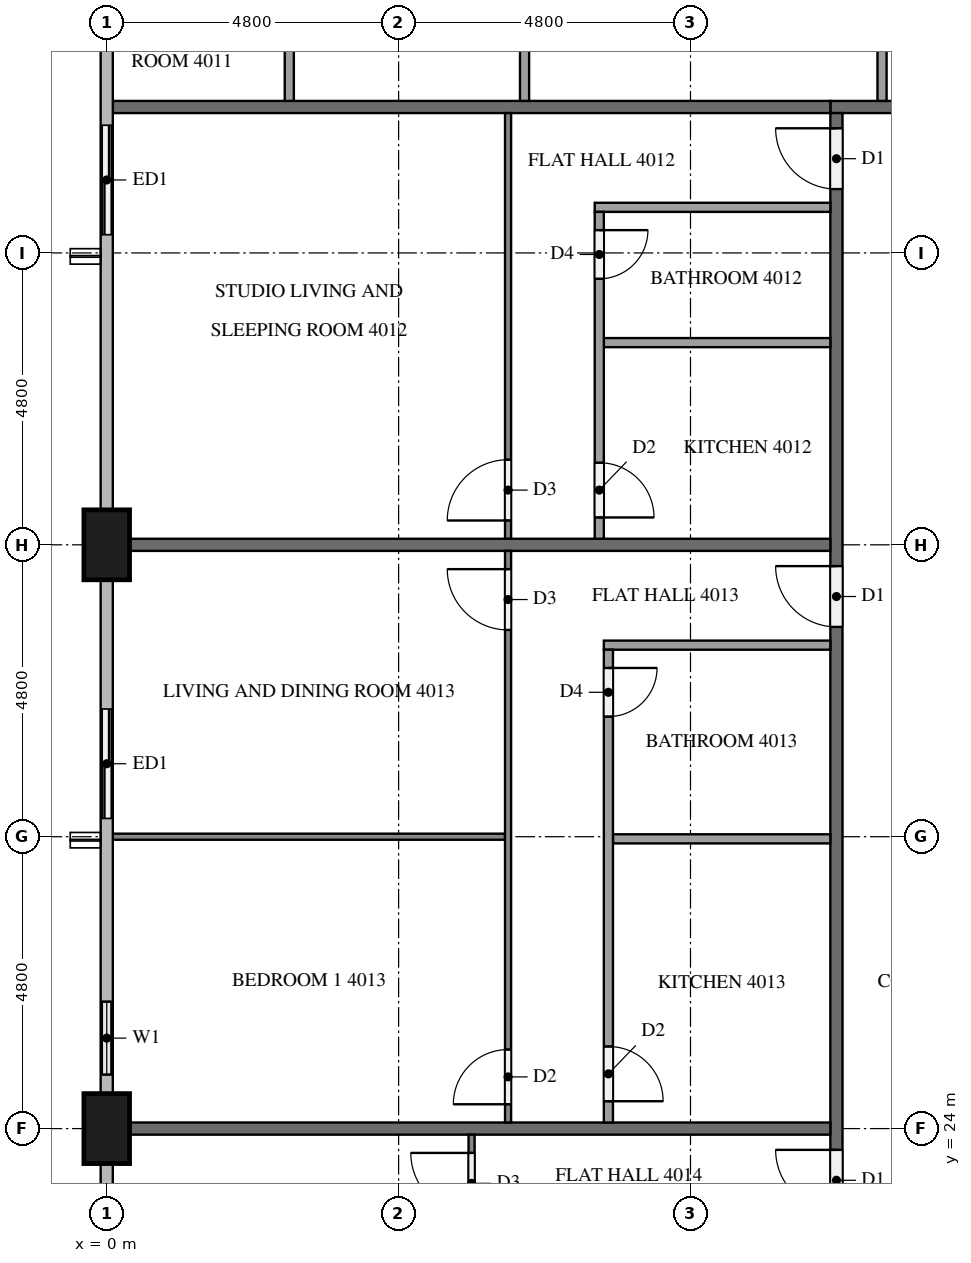
"""IFC4 building model, lengths in metres.
Left out: names, types, materials, properties, quantities, classifications, styles, units other than length and angle.
Written with IfcOpenShell. Run it as: python <this file> out.ifc"""

import sys

from ifc_helpers import new_model, si_unit, direction, frame, frame_2d, origin, origin_2d, place, context, subcontext, project, spatial, rectangle, extrude, element, fill, save


model = new_model("IFC4")
c1 = context("Model", 3, precision=1e-05, world=origin(), true_north=direction((0.0, 1.0)))
c2 = subcontext(c1, "Body", "Model", "MODEL_VIEW")
j1 = project(units=[si_unit("LENGTHUNIT", "METRE"), si_unit("PLANEANGLEUNIT", "RADIAN")], contexts=[c1])
p1 = place(None, origin())
s1 = spatial("IfcSite", under=j1, at=p1, CompositionType="ELEMENT")
p2 = place(p1, origin())
s2 = spatial("IfcBuilding", under=s1, at=p2, CompositionType="ELEMENT")
p3 = place(p2, frame((0.0, 0.0, 156.0)))
s3 = spatial("IfcBuildingStorey", under=s2, at=p3, CompositionType="ELEMENT", Elevation=156.0)
for number, where, z_axis, x_axis in (
    (1, (0.0, 33.6, 0.0), (0.0, 0.0, 1.0), (0.0, 1.0, 0.0)),
    (2, (0.0, 24.0, 0.0), (0.0, 0.0, 1.0), (0.0, 1.0, 0.0)),
):
    element("IfcColumn", number, at=place(p3, frame(where, z_axis=z_axis, x_axis=x_axis)), inside=s3, PredefinedType="COLUMN", context=c2, shape_type="SweptSolid", body=[
        extrude(rectangle(XDim=1.15, YDim=0.75, at=origin_2d()), origin(), (0.0, 0.0, 1.0), 3.2),
    ])
p4 = place(p3, frame((0.0, 40.8, 0.0), z_axis=(0.0, 0.0, 1.0), x_axis=(0.0, -1.0, 0.0)))
e3 = element("IfcWall", 3, at=p4, inside=s3, PredefinedType="SOLIDWALL", context=c2, shape_type="SweptSolid", body=[
    extrude(rectangle(XDim=2.4, YDim=0.15, at=frame_2d((1.2, 0.0))), origin(), (0.0, 0.0, 1.0), 3.2),
])
p5 = place(p4, frame((0.3, 0.0, 0.0)))
e4 = element("IfcOpeningElement", 4, at=p5, cuts=e3, PredefinedType="OPENING", context=c2, shape_type="SweptSolid", body=[
    extrude(rectangle(XDim=1.8, YDim=2.4, at=frame_2d((0.9, 1.2))), frame((0.0, 0.085, 0.0), z_axis=(0.0, -1.0, 0.0), x_axis=(1.0, 0.0, 0.0)), (0.0, 0.0, 1.0), 0.17),
])
p6 = place(p3, frame((0.0, 31.2, 0.0), z_axis=(0.0, 0.0, 1.0), x_axis=(0.0, -1.0, 0.0)))
e5 = element("IfcWall", 5, at=p6, inside=s3, PredefinedType="SOLIDWALL", context=c2, shape_type="SweptSolid", body=[
    extrude(rectangle(XDim=2.4, YDim=0.15, at=frame_2d((1.2, 0.0))), origin(), (0.0, 0.0, 1.0), 3.2),
])
p7 = place(p6, frame((0.3, 0.0, 0.0)))
e6 = element("IfcOpeningElement", 6, at=p7, cuts=e5, PredefinedType="OPENING", context=c2, shape_type="SweptSolid", body=[
    extrude(rectangle(XDim=1.8, YDim=2.4, at=frame_2d((0.9, 1.2))), frame((0.0, 0.085, 0.0), z_axis=(0.0, -1.0, 0.0), x_axis=(1.0, 0.0, 0.0)), (0.0, 0.0, 1.0), 0.17),
])
p8 = place(p3, frame((0.0, 26.4, 0.0), z_axis=(0.0, 0.0, 1.0), x_axis=(0.0, -1.0, 0.0)))
e7 = element("IfcWall", 7, at=p8, inside=s3, PredefinedType="SOLIDWALL", context=c2, shape_type="SweptSolid", body=[
    extrude(rectangle(XDim=1.825, YDim=0.15, at=frame_2d((0.913, 0.0))), origin(), (0.0, 0.0, 1.0), 3.2),
])
p9 = place(p8, frame((0.312, 0.0, 0.9)))
e8 = element("IfcOpeningElement", 8, at=p9, cuts=e7, PredefinedType="OPENING", context=c2, shape_type="SweptSolid", body=[
    extrude(rectangle(XDim=1.2, YDim=1.4, at=frame_2d((0.6, 0.7))), frame((0.0, 0.085, 0.0), z_axis=(0.0, -1.0, 0.0), x_axis=(1.0, 0.0, 0.0)), (0.0, 0.0, 1.0), 0.17),
])
p10 = place(p3, frame((11.9, 40.8, 0.0), z_axis=(0.0, 0.0, 1.0), x_axis=(1.0, 0.0, 0.0)))
e9 = element("IfcWall", 9, at=p10, inside=s3, PredefinedType="PARTITIONING", context=c2, shape_type="SweptSolid", body=[
    extrude(rectangle(XDim=38.6, YDim=0.2, at=frame_2d((19.3, 0.0))), origin(), (0.0, 0.0, 1.0), 3.2),
])
p11 = place(p10, frame((31.65, 0.0, 0.0)))
e10 = element("IfcOpeningElement", 10, at=p11, cuts=e9, PredefinedType="OPENING", context=c2, shape_type="SweptSolid", body=[
    extrude(rectangle(XDim=1.0, YDim=2.1, at=frame_2d((0.5, 1.05))), frame((0.0, 0.11, 0.0), z_axis=(0.0, -1.0, 0.0), x_axis=(1.0, 0.0, 0.0)), (0.0, 0.0, 1.0), 0.22),
])
p12 = place(p10, frame((29.95, 0.0, 0.0)))
e11 = element("IfcOpeningElement", 11, at=p12, cuts=e9, PredefinedType="OPENING", context=c2, shape_type="SweptSolid", body=[
    extrude(rectangle(XDim=1.0, YDim=2.1, at=frame_2d((0.5, 1.05))), frame((0.0, 0.11, 0.0), z_axis=(0.0, -1.0, 0.0), x_axis=(1.0, 0.0, 0.0)), (0.0, 0.0, 1.0), 0.22),
])
p13 = place(p10, frame((15.55, 0.0, 0.0)))
e12 = element("IfcOpeningElement", 12, at=p13, cuts=e9, PredefinedType="OPENING", context=c2, shape_type="SweptSolid", body=[
    extrude(rectangle(XDim=1.0, YDim=2.1, at=frame_2d((0.5, 1.05))), frame((0.0, 0.11, 0.0), z_axis=(0.0, -1.0, 0.0), x_axis=(1.0, 0.0, 0.0)), (0.0, 0.0, 1.0), 0.22),
])
p14 = place(p10, frame((1.15, 0.0, 0.0)))
e13 = element("IfcOpeningElement", 13, at=p14, cuts=e9, PredefinedType="OPENING", context=c2, shape_type="SweptSolid", body=[
    extrude(rectangle(XDim=1.0, YDim=2.1, at=frame_2d((0.5, 1.05))), frame((0.0, 0.11, 0.0), z_axis=(0.0, -1.0, 0.0), x_axis=(1.0, 0.0, 0.0)), (0.0, 0.0, 1.0), 0.22),
])
p15 = place(p3, frame((12.0, 12.1, 0.0), z_axis=(0.0, 0.0, 1.0), x_axis=(0.0, 1.0, 0.0)))
e14 = element("IfcWall", 14, at=p15, inside=s3, PredefinedType="PARTITIONING", context=c2, shape_type="SweptSolid", body=[
    extrude(rectangle(XDim=28.6, YDim=0.2, at=frame_2d((14.3, 0.0))), origin(), (0.0, 0.0, 1.0), 3.2),
])
p16 = place(p15, frame((27.35, 0.0, 0.0)))
e15 = element("IfcOpeningElement", 15, at=p16, cuts=e14, PredefinedType="OPENING", context=c2, shape_type="SweptSolid", body=[
    extrude(rectangle(XDim=1.0, YDim=2.1, at=frame_2d((0.5, 1.05))), frame((0.0, 0.11, 0.0), z_axis=(0.0, -1.0, 0.0), x_axis=(1.0, 0.0, 0.0)), (0.0, 0.0, 1.0), 0.22),
])
p17 = place(p15, frame((20.15, 0.0, 0.0)))
e16 = element("IfcOpeningElement", 16, at=p17, cuts=e14, PredefinedType="OPENING", context=c2, shape_type="SweptSolid", body=[
    extrude(rectangle(XDim=1.0, YDim=2.1, at=frame_2d((0.5, 1.05))), frame((0.0, 0.11, 0.0), z_axis=(0.0, -1.0, 0.0), x_axis=(1.0, 0.0, 0.0)), (0.0, 0.0, 1.0), 0.22),
])
p18 = place(p15, frame((10.55, 0.0, 0.0)))
e17 = element("IfcOpeningElement", 17, at=p18, cuts=e14, PredefinedType="OPENING", context=c2, shape_type="SweptSolid", body=[
    extrude(rectangle(XDim=1.0, YDim=2.1, at=frame_2d((0.5, 1.05))), frame((0.0, 0.11, 0.0), z_axis=(0.0, -1.0, 0.0), x_axis=(1.0, 0.0, 0.0)), (0.0, 0.0, 1.0), 0.22),
])
p19 = place(p3, frame((0.1, 40.8, 0.0), z_axis=(0.0, 0.0, 1.0), x_axis=(1.0, 0.0, 0.0)))
e18 = element("IfcWall", 18, at=p19, inside=s3, PredefinedType="PARTITIONING", context=c2, shape_type="SweptSolid", body=[
    extrude(rectangle(XDim=11.8, YDim=0.2, at=frame_2d((5.9, 0.0))), origin(), (0.0, 0.0, 1.0), 3.2),
])
for number, where, z_axis, x_axis in (
    (19, (0.375, 33.6, 0.0), (0.0, 0.0, 1.0), (1.0, 0.0, 0.0)),
    (20, (0.375, 24.0, 0.0), (0.0, 0.0, 1.0), (1.0, 0.0, 0.0)),
):
    element("IfcWall", number, at=place(p3, frame(where, z_axis=z_axis, x_axis=x_axis)), inside=s3, PredefinedType="PARTITIONING", context=c2, shape_type="SweptSolid", body=[
        extrude(rectangle(XDim=11.525, YDim=0.2, at=frame_2d((5.762, 0.0))), origin(), (0.0, 0.0, 1.0), 3.2),
    ])
for number, where, z_axis, x_axis in (
    (21, (6.871, 40.9, 0.0), (0.0, 0.0, 1.0), (0.0, 1.0, 0.0)),
    (22, (3.002, 40.9, 0.0), (0.0, 0.0, 1.0), (0.0, 1.0, 0.0)),
):
    element("IfcWall", number, at=place(p3, frame(where, z_axis=z_axis, x_axis=x_axis)), inside=s3, PredefinedType="PARTITIONING", context=c2, shape_type="SweptSolid", body=[
        extrude(rectangle(XDim=2.075, YDim=0.15, at=frame_2d((1.038, 0.0))), origin(), (0.0, 0.0, 1.0), 3.2),
    ])
p20 = place(p3, frame((12.75, 40.9, 0.0), z_axis=(0.0, 0.0, 1.0), x_axis=(0.0, 1.0, 0.0)))
e23 = element("IfcWall", 23, at=p20, inside=s3, PredefinedType="PARTITIONING", context=c2, shape_type="SweptSolid", body=[
    extrude(rectangle(XDim=2.225, YDim=0.15, at=frame_2d((1.113, 0.0))), origin(), (0.0, 0.0, 1.0), 3.2),
])
p21 = place(p3, frame((6.6, 33.7, 0.0), z_axis=(0.0, 0.0, 1.0), x_axis=(0.0, 1.0, 0.0)))
e24 = element("IfcWall", 24, at=p21, inside=s3, PredefinedType="PARTITIONING", context=c2, shape_type="SweptSolid", body=[
    extrude(rectangle(XDim=7.0, YDim=0.1, at=frame_2d((3.5, 0.0))), origin(), (0.0, 0.0, 1.0), 3.2),
])
p22 = place(p21, frame((0.3, 0.0, 0.0)))
e25 = element("IfcOpeningElement", 25, at=p22, cuts=e24, PredefinedType="OPENING", context=c2, shape_type="SweptSolid", body=[
    extrude(rectangle(XDim=1.0, YDim=2.1, at=frame_2d((0.5, 1.05))), frame((0.0, 0.06, 0.0), z_axis=(0.0, -1.0, 0.0), x_axis=(1.0, 0.0, 0.0)), (0.0, 0.0, 1.0), 0.12),
])
p23 = place(p3, frame((11.9, 36.925, 0.0), z_axis=(0.0, 0.0, 1.0), x_axis=(-1.0, 0.0, 0.0)))
e26 = element("IfcWall", 26, at=p23, inside=s3, PredefinedType="PARTITIONING", context=c2, shape_type="SweptSolid", body=[
    extrude(rectangle(XDim=3.725, YDim=0.15, at=frame_2d((1.862, 0.0))), origin(), (0.0, 0.0, 1.0), 3.2),
])
p24 = place(p3, frame((11.9, 39.15, 0.0), z_axis=(0.0, 0.0, 1.0), x_axis=(-1.0, 0.0, 0.0)))
e27 = element("IfcWall", 27, at=p24, inside=s3, PredefinedType="PARTITIONING", context=c2, shape_type="SweptSolid", body=[
    extrude(rectangle(XDim=3.875, YDim=0.15, at=frame_2d((1.938, 0.0))), origin(), (0.0, 0.0, 1.0), 3.2),
])
p25 = place(p3, frame((8.1, 39.075, 0.0), z_axis=(0.0, 0.0, 1.0), x_axis=(0.0, -1.0, 0.0)))
e28 = element("IfcWall", 28, at=p25, inside=s3, PredefinedType="PARTITIONING", context=c2, shape_type="SweptSolid", body=[
    extrude(rectangle(XDim=5.375, YDim=0.15, at=frame_2d((2.688, 0.0))), origin(), (0.0, 0.0, 1.0), 3.2),
])
p26 = place(p25, frame((0.3, 0.0, 0.0)))
e29 = element("IfcOpeningElement", 29, at=p26, cuts=e28, PredefinedType="OPENING", context=c2, shape_type="SweptSolid", body=[
    extrude(rectangle(XDim=0.8, YDim=2.1, at=frame_2d((0.4, 1.05))), frame((0.0, 0.085, 0.0), z_axis=(0.0, -1.0, 0.0), x_axis=(1.0, 0.0, 0.0)), (0.0, 0.0, 1.0), 0.17),
])
p27 = place(p25, frame((4.125, 0.0, 0.0)))
e30 = element("IfcOpeningElement", 30, at=p27, cuts=e28, PredefinedType="OPENING", context=c2, shape_type="SweptSolid", body=[
    extrude(rectangle(XDim=0.9, YDim=2.1, at=frame_2d((0.45, 1.05))), frame((0.0, 0.085, 0.0), z_axis=(0.0, -1.0, 0.0), x_axis=(1.0, 0.0, 0.0)), (0.0, 0.0, 1.0), 0.17),
])
p28 = place(p3, frame((6.55, 28.8, 0.0), z_axis=(0.0, 0.0, 1.0), x_axis=(-1.0, 0.0, 0.0)))
e31 = element("IfcWall", 31, at=p28, inside=s3, PredefinedType="PARTITIONING", context=c2, shape_type="SweptSolid", body=[
    extrude(rectangle(XDim=6.45, YDim=0.1, at=frame_2d((3.225, 0.0))), origin(), (0.0, 0.0, 1.0), 3.2),
])
p29 = place(p3, frame((6.6, 24.1, 0.0), z_axis=(0.0, 0.0, 1.0), x_axis=(0.0, 1.0, 0.0)))
e32 = element("IfcWall", 32, at=p29, inside=s3, PredefinedType="PARTITIONING", context=c2, shape_type="SweptSolid", body=[
    extrude(rectangle(XDim=9.4, YDim=0.1, at=frame_2d((4.7, 0.0))), origin(), (0.0, 0.0, 1.0), 3.2),
])
p30 = place(p29, frame((8.1, 0.0, 0.0)))
e33 = element("IfcOpeningElement", 33, at=p30, cuts=e32, PredefinedType="OPENING", context=c2, shape_type="SweptSolid", body=[
    extrude(rectangle(XDim=1.0, YDim=2.1, at=frame_2d((0.5, 1.05))), frame((0.0, 0.06, 0.0), z_axis=(0.0, -1.0, 0.0), x_axis=(1.0, 0.0, 0.0)), (0.0, 0.0, 1.0), 0.12),
])
p31 = place(p29, frame((0.3, 0.0, 0.0)))
e34 = element("IfcOpeningElement", 34, at=p31, cuts=e32, PredefinedType="OPENING", context=c2, shape_type="SweptSolid", body=[
    extrude(rectangle(XDim=0.9, YDim=2.1, at=frame_2d((0.45, 1.05))), frame((0.0, 0.06, 0.0), z_axis=(0.0, -1.0, 0.0), x_axis=(1.0, 0.0, 0.0)), (0.0, 0.0, 1.0), 0.12),
])
p32 = place(p3, frame((11.9, 28.765, 0.0), z_axis=(0.0, 0.0, 1.0), x_axis=(-1.0, 0.0, 0.0)))
e35 = element("IfcWall", 35, at=p32, inside=s3, PredefinedType="PARTITIONING", context=c2, shape_type="SweptSolid", body=[
    extrude(rectangle(XDim=3.575, YDim=0.15, at=frame_2d((1.788, 0.0))), origin(), (0.0, 0.0, 1.0), 3.2),
])
p33 = place(p3, frame((11.9, 31.95, 0.0), z_axis=(0.0, 0.0, 1.0), x_axis=(-1.0, 0.0, 0.0)))
e36 = element("IfcWall", 36, at=p33, inside=s3, PredefinedType="PARTITIONING", context=c2, shape_type="SweptSolid", body=[
    extrude(rectangle(XDim=3.725, YDim=0.15, at=frame_2d((1.862, 0.0))), origin(), (0.0, 0.0, 1.0), 3.2),
])
p34 = place(p3, frame((8.25, 31.875, 0.0), z_axis=(0.0, 0.0, 1.0), x_axis=(0.0, -1.0, 0.0)))
e37 = element("IfcWall", 37, at=p34, inside=s3, PredefinedType="PARTITIONING", context=c2, shape_type="SweptSolid", body=[
    extrude(rectangle(XDim=7.775, YDim=0.15, at=frame_2d((3.887, 0.0))), origin(), (0.0, 0.0, 1.0), 3.2),
])
p35 = place(p34, frame((0.3, 0.0, 0.0)))
e38 = element("IfcOpeningElement", 38, at=p35, cuts=e37, PredefinedType="OPENING", context=c2, shape_type="SweptSolid", body=[
    extrude(rectangle(XDim=0.8, YDim=2.1, at=frame_2d((0.4, 1.05))), frame((0.0, 0.085, 0.0), z_axis=(0.0, -1.0, 0.0), x_axis=(1.0, 0.0, 0.0)), (0.0, 0.0, 1.0), 0.17),
])
p36 = place(p34, frame((6.525, 0.0, 0.0)))
e39 = element("IfcOpeningElement", 39, at=p36, cuts=e37, PredefinedType="OPENING", context=c2, shape_type="SweptSolid", body=[
    extrude(rectangle(XDim=0.9, YDim=2.1, at=frame_2d((0.45, 1.05))), frame((0.0, 0.085, 0.0), z_axis=(0.0, -1.0, 0.0), x_axis=(1.0, 0.0, 0.0)), (0.0, 0.0, 1.0), 0.17),
])
p37 = place(p3, frame((6.0, 12.1, 0.0), z_axis=(0.0, 0.0, 1.0), x_axis=(0.0, 1.0, 0.0)))
e40 = element("IfcWall", 40, at=p37, inside=s3, PredefinedType="PARTITIONING", context=c2, shape_type="SweptSolid", body=[
    extrude(rectangle(XDim=11.8, YDim=0.1, at=frame_2d((5.9, 0.0))), origin(), (0.0, 0.0, 1.0), 3.2),
])
p38 = place(p37, frame((10.5, 0.0, 0.0)))
e41 = element("IfcOpeningElement", 41, at=p38, cuts=e40, PredefinedType="OPENING", context=c2, shape_type="SweptSolid", body=[
    extrude(rectangle(XDim=1.0, YDim=2.1, at=frame_2d((0.5, 1.05))), frame((0.0, 0.06, 0.0), z_axis=(0.0, -1.0, 0.0), x_axis=(1.0, 0.0, 0.0)), (0.0, 0.0, 1.0), 0.12),
])
p39 = place(p37, frame((0.3, 0.0, 0.0)))
e42 = element("IfcOpeningElement", 42, at=p39, cuts=e40, PredefinedType="OPENING", context=c2, shape_type="SweptSolid", body=[
    extrude(rectangle(XDim=0.9, YDim=2.1, at=frame_2d((0.45, 1.05))), frame((0.0, 0.06, 0.0), z_axis=(0.0, -1.0, 0.0), x_axis=(1.0, 0.0, 0.0)), (0.0, 0.0, 1.0), 0.12),
])
p40 = place(p5, origin())
e43 = element("IfcDoor", 43, at=p40, inside=s3, OperationType="SLIDING_TO_LEFT", PredefinedType="DOOR", context=c2, shape_type="SweptSolid", body=[
    extrude(rectangle(XDim=1.8, YDim=2.4, at=frame_2d((0.9, 1.2))), frame((0.0, 0.025, 0.0), z_axis=(0.0, -1.0, 0.0), x_axis=(1.0, 0.0, 0.0)), (0.0, 0.0, 1.0), 0.05),
])
fill(e4, e43)
p41 = place(p7, origin())
e44 = element("IfcDoor", 44, at=p41, inside=s3, OperationType="SLIDING_TO_RIGHT", PredefinedType="DOOR", context=c2, shape_type="SweptSolid", body=[
    extrude(rectangle(XDim=1.8, YDim=2.4, at=frame_2d((0.9, 1.2))), frame((0.0, 0.025, 0.0), z_axis=(0.0, -1.0, 0.0), x_axis=(1.0, 0.0, 0.0)), (0.0, 0.0, 1.0), 0.05),
])
fill(e6, e44)
p42 = place(p9, origin())
e45 = element("IfcWindow", 45, at=p42, inside=s3, PartitioningType="SINGLE_PANEL", PredefinedType="WINDOW", context=c2, shape_type="SweptSolid", body=[
    extrude(rectangle(XDim=1.2, YDim=1.4, at=frame_2d((0.6, 0.7))), frame((0.0, 0.03, 0.0), z_axis=(0.0, -1.0, 0.0), x_axis=(1.0, 0.0, 0.0)), (0.0, 0.0, 1.0), 0.06),
])
fill(e8, e45)
p43 = place(p16, origin())
e46 = element("IfcDoor", 46, at=p43, inside=s3, OperationType="SINGLE_SWING_RIGHT", PredefinedType="DOOR", context=c2, shape_type="SweptSolid", body=[
    extrude(rectangle(XDim=1.0, YDim=2.1, at=frame_2d((0.5, 1.05))), frame((0.0, 0.025, 0.0), z_axis=(0.0, -1.0, 0.0), x_axis=(1.0, 0.0, 0.0)), (0.0, 0.0, 1.0), 0.05),
])
fill(e15, e46)
p44 = place(p17, origin())
e47 = element("IfcDoor", 47, at=p44, inside=s3, OperationType="SINGLE_SWING_RIGHT", PredefinedType="DOOR", context=c2, shape_type="SweptSolid", body=[
    extrude(rectangle(XDim=1.0, YDim=2.1, at=frame_2d((0.5, 1.05))), frame((0.0, 0.025, 0.0), z_axis=(0.0, -1.0, 0.0), x_axis=(1.0, 0.0, 0.0)), (0.0, 0.0, 1.0), 0.05),
])
fill(e16, e47)
p45 = place(p18, origin())
e48 = element("IfcDoor", 48, at=p45, inside=s3, OperationType="SINGLE_SWING_RIGHT", PredefinedType="DOOR", context=c2, shape_type="SweptSolid", body=[
    extrude(rectangle(XDim=1.0, YDim=2.1, at=frame_2d((0.5, 1.05))), frame((0.0, 0.025, 0.0), z_axis=(0.0, -1.0, 0.0), x_axis=(1.0, 0.0, 0.0)), (0.0, 0.0, 1.0), 0.05),
])
fill(e17, e48)
p46 = place(p22, origin())
e49 = element("IfcDoor", 49, at=p46, inside=s3, OperationType="SINGLE_SWING_LEFT", PredefinedType="DOOR", context=c2, shape_type="SweptSolid", body=[
    extrude(rectangle(XDim=1.0, YDim=2.1, at=frame_2d((0.5, 1.05))), frame((0.0, 0.025, 0.0), z_axis=(0.0, -1.0, 0.0), x_axis=(1.0, 0.0, 0.0)), (0.0, 0.0, 1.0), 0.05),
])
fill(e25, e49)
p47 = place(p26, origin())
e50 = element("IfcDoor", 50, at=p47, inside=s3, OperationType="SINGLE_SWING_LEFT", PredefinedType="DOOR", context=c2, shape_type="SweptSolid", body=[
    extrude(rectangle(XDim=0.8, YDim=2.1, at=frame_2d((0.4, 1.05))), frame((0.0, 0.025, 0.0), z_axis=(0.0, -1.0, 0.0), x_axis=(1.0, 0.0, 0.0)), (0.0, 0.0, 1.0), 0.05),
])
fill(e29, e50)
p48 = place(p27, origin())
e51 = element("IfcDoor", 51, at=p48, inside=s3, OperationType="SINGLE_SWING_RIGHT", PredefinedType="DOOR", context=c2, shape_type="SweptSolid", body=[
    extrude(rectangle(XDim=0.9, YDim=2.1, at=frame_2d((0.45, 1.05))), frame((0.0, 0.025, 0.0), z_axis=(0.0, -1.0, 0.0), x_axis=(1.0, 0.0, 0.0)), (0.0, 0.0, 1.0), 0.05),
])
fill(e30, e51)
p49 = place(p30, origin())
e52 = element("IfcDoor", 52, at=p49, inside=s3, OperationType="SINGLE_SWING_RIGHT", PredefinedType="DOOR", context=c2, shape_type="SweptSolid", body=[
    extrude(rectangle(XDim=1.0, YDim=2.1, at=frame_2d((0.5, 1.05))), frame((0.0, 0.025, 0.0), z_axis=(0.0, -1.0, 0.0), x_axis=(1.0, 0.0, 0.0)), (0.0, 0.0, 1.0), 0.05),
])
fill(e33, e52)
p50 = place(p31, origin())
e53 = element("IfcDoor", 53, at=p50, inside=s3, OperationType="SINGLE_SWING_LEFT", PredefinedType="DOOR", context=c2, shape_type="SweptSolid", body=[
    extrude(rectangle(XDim=0.9, YDim=2.1, at=frame_2d((0.45, 1.05))), frame((0.0, 0.025, 0.0), z_axis=(0.0, -1.0, 0.0), x_axis=(1.0, 0.0, 0.0)), (0.0, 0.0, 1.0), 0.05),
])
fill(e34, e53)
p51 = place(p35, origin())
e54 = element("IfcDoor", 54, at=p51, inside=s3, OperationType="SINGLE_SWING_LEFT", PredefinedType="DOOR", context=c2, shape_type="SweptSolid", body=[
    extrude(rectangle(XDim=0.8, YDim=2.1, at=frame_2d((0.4, 1.05))), frame((0.0, 0.025, 0.0), z_axis=(0.0, -1.0, 0.0), x_axis=(1.0, 0.0, 0.0)), (0.0, 0.0, 1.0), 0.05),
])
fill(e38, e54)
p52 = place(p36, origin())
e55 = element("IfcDoor", 55, at=p52, inside=s3, OperationType="SINGLE_SWING_RIGHT", PredefinedType="DOOR", context=c2, shape_type="SweptSolid", body=[
    extrude(rectangle(XDim=0.9, YDim=2.1, at=frame_2d((0.45, 1.05))), frame((0.0, 0.025, 0.0), z_axis=(0.0, -1.0, 0.0), x_axis=(1.0, 0.0, 0.0)), (0.0, 0.0, 1.0), 0.05),
])
fill(e39, e55)
p53 = place(p38, origin())
e56 = element("IfcDoor", 56, at=p53, inside=s3, OperationType="SINGLE_SWING_RIGHT", PredefinedType="DOOR", context=c2, shape_type="SweptSolid", body=[
    extrude(rectangle(XDim=1.0, YDim=2.1, at=frame_2d((0.5, 1.05))), frame((0.0, 0.025, 0.0), z_axis=(0.0, -1.0, 0.0), x_axis=(1.0, 0.0, 0.0)), (0.0, 0.0, 1.0), 0.05),
])
fill(e41, e56)
save(model, sys.argv[1])
